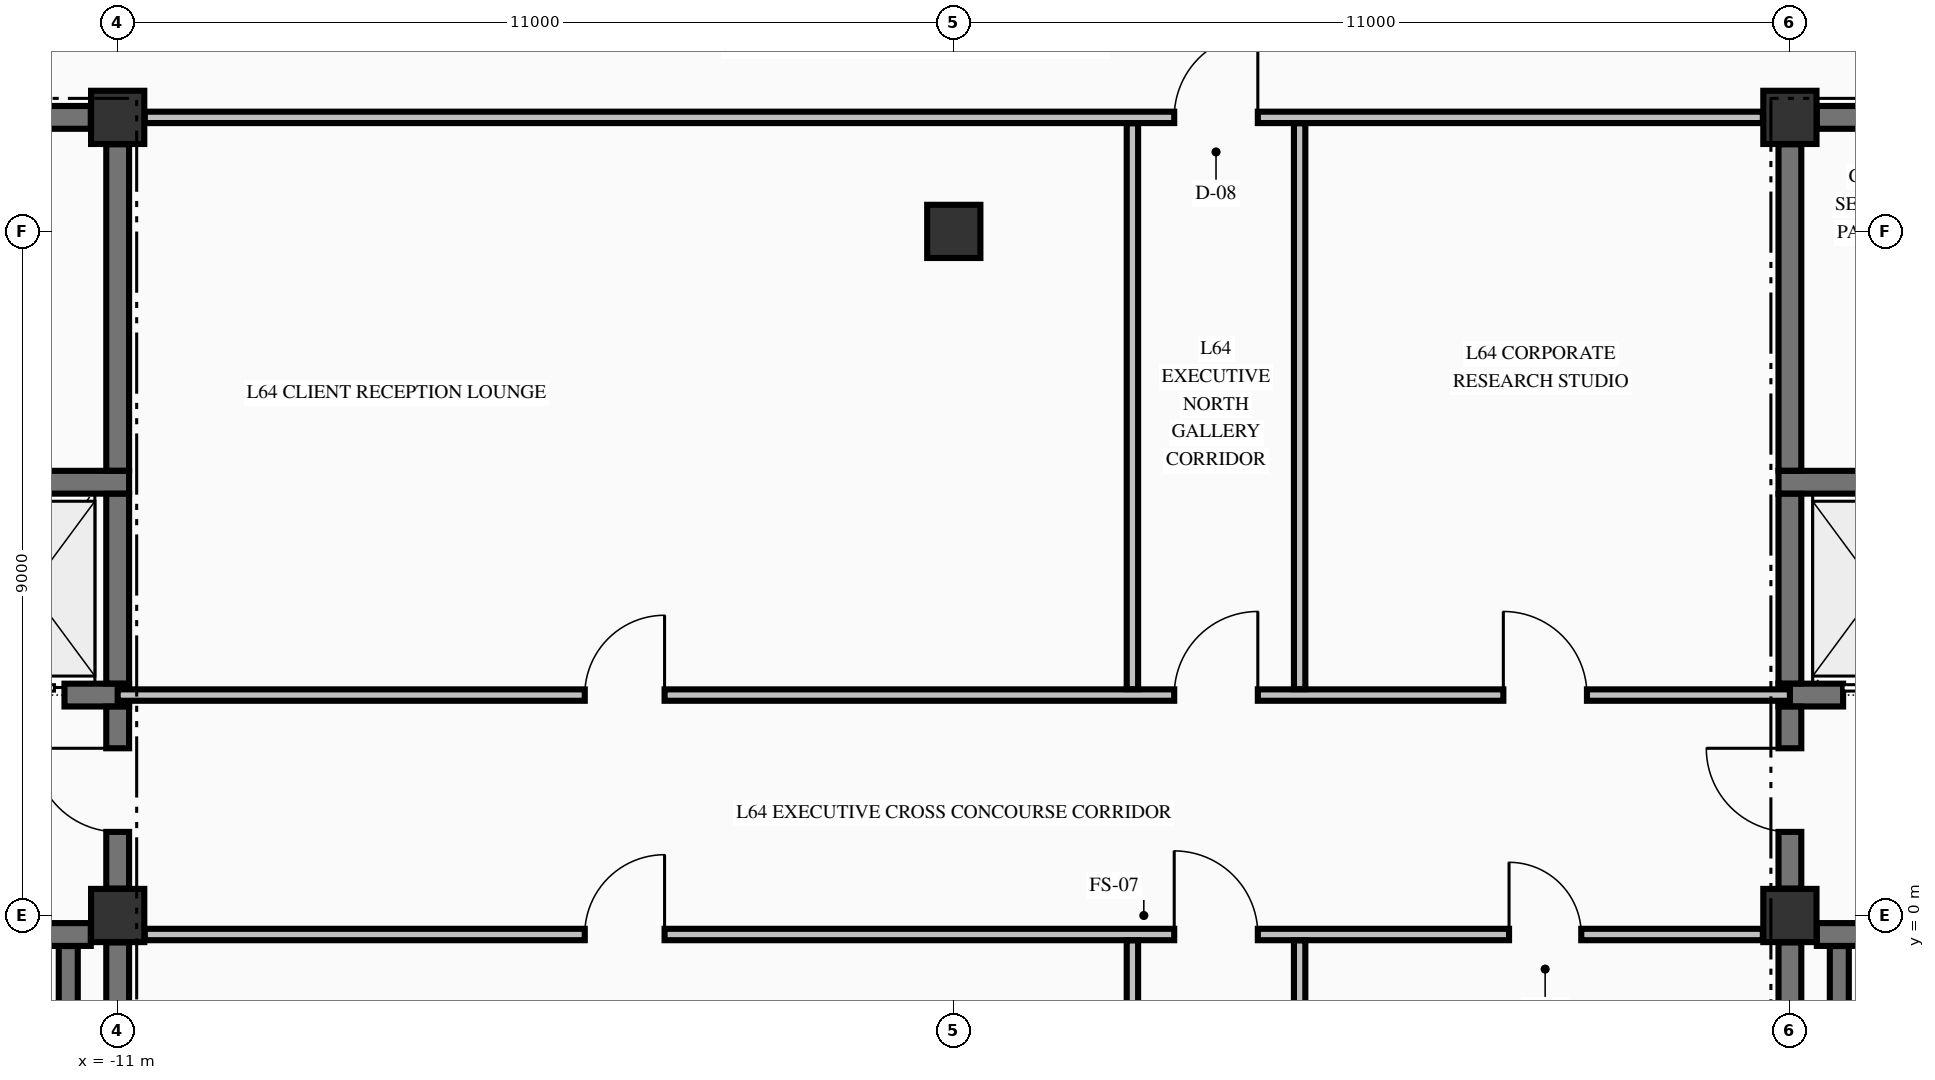
"""IFC4 building model, lengths in metres.
Left out: names, types, materials, properties, quantities, classifications, styles, units other than length and angle.
Written with IfcOpenShell. Run it as: python <this file> out.ifc"""

import sys

from ifc_helpers import new_model, si_unit, direction, frame, frame_2d, origin, origin_2d, place, context, subcontext, project, spatial, rectangle, extrude, element, fill, save


model = new_model("IFC4")
c1 = context("Model", 3, precision=1e-05, world=origin(), true_north=direction((0.0, 1.0)))
c2 = subcontext(c1, "Body", "Model", "MODEL_VIEW")
j1 = project(units=[si_unit("LENGTHUNIT", "METRE"), si_unit("PLANEANGLEUNIT", "RADIAN")], contexts=[c1])
p1 = place(None, origin())
s1 = spatial("IfcSite", under=j1, at=p1, CompositionType="ELEMENT")
p2 = place(p1, origin())
s2 = spatial("IfcBuilding", under=s1, at=p2, CompositionType="ELEMENT")
p3 = place(p2, frame((0.0, 0.0, 242.97)))
s3 = spatial("IfcBuildingStorey", under=s2, at=p3, CompositionType="ELEMENT", Elevation=242.97)
for number, where, z_axis, x_axis in (
    (1, (-11.0, 0.0, -0.25), (0.0, 0.0, 1.0), (1.0, 0.0, 0.0)),
    (2, (-11.0, 10.5, -0.25), (0.0, 0.0, 1.0), (1.0, 0.0, 0.0)),
    (3, (11.0, 0.0, -0.25), (0.0, 0.0, 1.0), (1.0, 0.0, 0.0)),
    (4, (11.0, 10.5, -0.25), (0.0, 0.0, 1.0), (1.0, 0.0, 0.0)),
    (5, (0.0, 9.0, -0.25), (0.0, 0.0, 1.0), (1.0, 0.0, 0.0)),
):
    element("IfcColumn", number, at=place(p3, frame(where, z_axis=z_axis, x_axis=x_axis)), inside=s3, PredefinedType="COLUMN", context=c2, shape_type="SweptSolid", body=[
        extrude(rectangle(XDim=0.7, YDim=0.7, at=origin_2d()), origin(), (0.0, 0.0, 1.0), 3.23),
    ])
p4 = place(p3, frame((-20.571, -0.25, 0.0), z_axis=(0.0, 0.0, 1.0), x_axis=(1.0, 0.0, 0.0)))
e6 = element("IfcWall", 6, at=p4, inside=s3, PredefinedType="SHEAR", context=c2, shape_type="SweptSolid", body=[
    extrude(rectangle(XDim=9.217, YDim=0.3, at=frame_2d((4.608, 0.0))), origin(), (0.0, 0.0, 1.0), 2.98),
])
p5 = place(p4, frame((6.871, 0.0, 0.0)))
e7 = element("IfcOpeningElement", 7, at=p5, cuts=e6, PredefinedType="OPENING", context=c2, shape_type="SweptSolid", body=[
    extrude(rectangle(XDim=1.1, YDim=2.15, at=frame_2d((0.55, 1.075))), frame((0.0, 0.16, 0.0), z_axis=(0.0, -1.0, 0.0), x_axis=(1.0, 0.0, 0.0)), (0.0, 0.0, 1.0), 0.32),
])
p6 = place(p3, frame((11.354, -0.25, 0.0), z_axis=(0.0, 0.0, 1.0), x_axis=(1.0, 0.0, 0.0)))
e8 = element("IfcWall", 8, at=p6, inside=s3, PredefinedType="SHEAR", context=c2, shape_type="SweptSolid", body=[
    extrude(rectangle(XDim=3.521, YDim=0.3, at=frame_2d((1.76, 0.0))), origin(), (0.0, 0.0, 1.0), 2.98),
])
p7 = place(p6, frame((1.246, 0.0, 0.0)))
e9 = element("IfcOpeningElement", 9, at=p7, cuts=e8, PredefinedType="OPENING", context=c2, shape_type="SweptSolid", body=[
    extrude(rectangle(XDim=1.1, YDim=2.15, at=frame_2d((0.55, 1.075))), frame((0.0, 0.16, 0.0), z_axis=(0.0, -1.0, 0.0), x_axis=(1.0, 0.0, 0.0)), (0.0, 0.0, 1.0), 0.32),
])
p8 = place(p3, frame((-14.875, 2.9, 0.0), z_axis=(0.0, 0.0, 1.0), x_axis=(1.0, 0.0, 0.0)))
e10 = element("IfcWall", 10, at=p8, inside=s3, PredefinedType="SHEAR", context=c2, shape_type="SweptSolid", body=[
    extrude(rectangle(XDim=4.025, YDim=0.3, at=frame_2d((2.012, 0.0))), origin(), (0.0, 0.0, 1.0), 2.98),
])
p9 = place(p8, frame((2.075, 0.0, 0.0)))
e11 = element("IfcOpeningElement", 11, at=p9, cuts=e10, PredefinedType="OPENING", context=c2, shape_type="SweptSolid", body=[
    extrude(rectangle(XDim=1.1, YDim=2.2, at=frame_2d((0.55, 1.1))), frame((0.0, 0.16, 0.0), z_axis=(0.0, -1.0, 0.0), x_axis=(1.0, 0.0, 0.0)), (0.0, 0.0, 1.0), 0.32),
])
p10 = place(p3, frame((10.85, 2.9, 0.0), z_axis=(0.0, 0.0, 1.0), x_axis=(1.0, 0.0, 0.0)))
e12 = element("IfcWall", 12, at=p10, inside=s3, PredefinedType="SHEAR", context=c2, shape_type="SweptSolid", body=[
    extrude(rectangle(XDim=4.025, YDim=0.3, at=frame_2d((2.012, 0.0))), origin(), (0.0, 0.0, 1.0), 2.98),
])
p11 = place(p10, frame((0.85, 0.0, 0.0)))
e13 = element("IfcOpeningElement", 13, at=p11, cuts=e12, PredefinedType="OPENING", context=c2, shape_type="SweptSolid", body=[
    extrude(rectangle(XDim=1.1, YDim=2.2, at=frame_2d((0.55, 1.1))), frame((0.0, 0.16, 0.0), z_axis=(0.0, -1.0, 0.0), x_axis=(1.0, 0.0, 0.0)), (0.0, 0.0, 1.0), 0.32),
])
for number, where, z_axis, x_axis in (
    (14, (-14.875, 5.7, 0.0), (0.0, 0.0, 1.0), (1.0, 0.0, 0.0)),
    (15, (10.85, 5.7, 0.0), (0.0, 0.0, 1.0), (1.0, 0.0, 0.0)),
):
    element("IfcWall", number, at=place(p3, frame(where, z_axis=z_axis, x_axis=x_axis)), inside=s3, PredefinedType="SHEAR", context=c2, shape_type="SweptSolid", body=[
        extrude(rectangle(XDim=4.025, YDim=0.3, at=frame_2d((2.012, 0.0))), origin(), (0.0, 0.0, 1.0), 2.98),
    ])
p12 = place(p3, frame((-14.7, 10.5, 0.0), z_axis=(0.0, 0.0, 1.0), x_axis=(1.0, 0.0, 0.0)))
e16 = element("IfcWall", 16, at=p12, inside=s3, PredefinedType="SHEAR", context=c2, shape_type="SweptSolid", body=[
    extrude(rectangle(XDim=3.346, YDim=0.3, at=frame_2d((1.673, 0.0))), origin(), (0.0, 0.0, 1.0), 2.98),
])
p13 = place(p12, frame((0.775, 0.0, 0.0)))
e17 = element("IfcOpeningElement", 17, at=p13, cuts=e16, PredefinedType="OPENING", context=c2, shape_type="SweptSolid", body=[
    extrude(rectangle(XDim=0.95, YDim=2.15, at=frame_2d((0.475, 1.075))), frame((0.0, 0.16, 0.0), z_axis=(0.0, -1.0, 0.0), x_axis=(1.0, 0.0, 0.0)), (0.0, 0.0, 1.0), 0.32),
])
p14 = place(p3, frame((11.354, 10.5, 0.0), z_axis=(0.0, 0.0, 1.0), x_axis=(1.0, 0.0, 0.0)))
e18 = element("IfcWall", 18, at=p14, inside=s3, PredefinedType="SHEAR", context=c2, shape_type="SweptSolid", body=[
    extrude(rectangle(XDim=3.346, YDim=0.3, at=frame_2d((1.673, 0.0))), origin(), (0.0, 0.0, 1.0), 2.98),
])
p15 = place(p14, frame((2.151, 0.0, 0.0)))
e19 = element("IfcOpeningElement", 19, at=p15, cuts=e18, PredefinedType="OPENING", context=c2, shape_type="SweptSolid", body=[
    extrude(rectangle(XDim=0.95, YDim=2.15, at=frame_2d((0.475, 1.075))), frame((0.0, 0.16, 0.0), z_axis=(0.0, -1.0, 0.0), x_axis=(1.0, 0.0, 0.0)), (0.0, 0.0, 1.0), 0.32),
])
p16 = place(p3, frame((-10.644, -0.25, 0.0), z_axis=(0.0, 0.0, 1.0), x_axis=(1.0, 0.0, 0.0)))
e20 = element("IfcWall", 20, at=p16, inside=s3, PredefinedType="PARTITIONING", context=c2, shape_type="SweptSolid", body=[
    extrude(rectangle(XDim=21.288, YDim=0.15, at=frame_2d((10.644, 0.0))), origin(), (0.0, 0.0, 1.0), 2.98),
])
p17 = place(p16, frame((13.544, 0.0, 0.0)))
e21 = element("IfcOpeningElement", 21, at=p17, cuts=e20, PredefinedType="OPENING", context=c2, shape_type="SweptSolid", body=[
    extrude(rectangle(XDim=1.1, YDim=2.15, at=frame_2d((0.55, 1.075))), frame((0.0, 0.085, 0.0), z_axis=(0.0, -1.0, 0.0), x_axis=(1.0, 0.0, 0.0)), (0.0, 0.0, 1.0), 0.17),
])
p18 = place(p16, frame((5.789, 0.0, 0.0)))
e22 = element("IfcOpeningElement", 22, at=p18, cuts=e20, PredefinedType="OPENING", context=c2, shape_type="SweptSolid", body=[
    extrude(rectangle(XDim=1.05, YDim=2.15, at=frame_2d((0.525, 1.075))), frame((0.0, 0.085, 0.0), z_axis=(0.0, -1.0, 0.0), x_axis=(1.0, 0.0, 0.0)), (0.0, 0.0, 1.0), 0.17),
])
p19 = place(p16, frame((17.949, 0.0, 0.0)))
e23 = element("IfcOpeningElement", 23, at=p19, cuts=e20, PredefinedType="OPENING", context=c2, shape_type="SweptSolid", body=[
    extrude(rectangle(XDim=0.95, YDim=2.15, at=frame_2d((0.475, 1.075))), frame((0.0, 0.085, 0.0), z_axis=(0.0, -1.0, 0.0), x_axis=(1.0, 0.0, 0.0)), (0.0, 0.0, 1.0), 0.17),
])
p20 = place(p3, frame((-11.0, 2.9, 0.0), z_axis=(0.0, 0.0, 1.0), x_axis=(1.0, 0.0, 0.0)))
e24 = element("IfcWall", 24, at=p20, inside=s3, PredefinedType="PARTITIONING", context=c2, shape_type="SweptSolid", body=[
    extrude(rectangle(XDim=22.0, YDim=0.15, at=frame_2d((11.0, 0.0))), origin(), (0.0, 0.0, 1.0), 2.98),
])
p21 = place(p20, frame((13.9, 0.0, 0.0)))
e25 = element("IfcOpeningElement", 25, at=p21, cuts=e24, PredefinedType="OPENING", context=c2, shape_type="SweptSolid", body=[
    extrude(rectangle(XDim=1.1, YDim=2.15, at=frame_2d((0.55, 1.075))), frame((0.0, 0.085, 0.0), z_axis=(0.0, -1.0, 0.0), x_axis=(1.0, 0.0, 0.0)), (0.0, 0.0, 1.0), 0.17),
])
p22 = place(p20, frame((6.145, 0.0, 0.0)))
e26 = element("IfcOpeningElement", 26, at=p22, cuts=e24, PredefinedType="OPENING", context=c2, shape_type="SweptSolid", body=[
    extrude(rectangle(XDim=1.05, YDim=2.15, at=frame_2d((0.525, 1.075))), frame((0.0, 0.085, 0.0), z_axis=(0.0, -1.0, 0.0), x_axis=(1.0, 0.0, 0.0)), (0.0, 0.0, 1.0), 0.17),
])
p23 = place(p20, frame((18.23, 0.0, 0.0)))
e27 = element("IfcOpeningElement", 27, at=p23, cuts=e24, PredefinedType="OPENING", context=c2, shape_type="SweptSolid", body=[
    extrude(rectangle(XDim=1.1, YDim=2.15, at=frame_2d((0.55, 1.075))), frame((0.0, 0.085, 0.0), z_axis=(0.0, -1.0, 0.0), x_axis=(1.0, 0.0, 0.0)), (0.0, 0.0, 1.0), 0.17),
])
p24 = place(p3, frame((-10.644, 10.5, 0.0), z_axis=(0.0, 0.0, 1.0), x_axis=(1.0, 0.0, 0.0)))
e28 = element("IfcWall", 28, at=p24, inside=s3, PredefinedType="PARTITIONING", context=c2, shape_type="SweptSolid", body=[
    extrude(rectangle(XDim=21.288, YDim=0.15, at=frame_2d((10.644, 0.0))), origin(), (0.0, 0.0, 1.0), 2.98),
])
p25 = place(p24, frame((13.544, 0.0, 0.0)))
e29 = element("IfcOpeningElement", 29, at=p25, cuts=e28, PredefinedType="OPENING", context=c2, shape_type="SweptSolid", body=[
    extrude(rectangle(XDim=1.1, YDim=2.15, at=frame_2d((0.55, 1.075))), frame((0.0, 0.085, 0.0), z_axis=(0.0, -1.0, 0.0), x_axis=(1.0, 0.0, 0.0)), (0.0, 0.0, 1.0), 0.17),
])
p26 = place(p3, frame((-11.65, -9.798, 0.0), z_axis=(0.0, 0.0, 1.0), x_axis=(0.0, 1.0, 0.0)))
e30 = element("IfcWall", 30, at=p26, inside=s3, PredefinedType="SOLIDWALL", context=c2, shape_type="SweptSolid", body=[
    extrude(rectangle(XDim=9.396, YDim=0.25, at=frame_2d((4.698, 0.0))), origin(), (0.0, 0.0, 1.0), 2.98),
])
p27 = place(p3, frame((-11.0, -9.596, 0.0), z_axis=(0.0, 0.0, 1.0), x_axis=(0.0, 1.0, 0.0)))
e31 = element("IfcWall", 31, at=p27, inside=s3, PredefinedType="SHEAR", context=c2, shape_type="SweptSolid", body=[
    extrude(rectangle(XDim=9.242, YDim=0.3, at=frame_2d((4.621, 0.0))), origin(), (0.0, 0.0, 1.0), 2.98),
])
p28 = place(p3, frame((-11.0, 0.354, 0.0), z_axis=(0.0, 0.0, 1.0), x_axis=(0.0, 1.0, 0.0)))
e32 = element("IfcWall", 32, at=p28, inside=s3, PredefinedType="SHEAR", context=c2, shape_type="SweptSolid", body=[
    extrude(rectangle(XDim=2.394, YDim=0.3, at=frame_2d((1.197, 0.0))), origin(), (0.0, 0.0, 1.0), 2.98),
])
p29 = place(p28, frame((0.746, 0.0, 0.0)))
e33 = element("IfcOpeningElement", 33, at=p29, cuts=e32, PredefinedType="OPENING", context=c2, shape_type="SweptSolid", body=[
    extrude(rectangle(XDim=1.1, YDim=2.15, at=frame_2d((0.55, 1.075))), frame((0.0, 0.16, 0.0), z_axis=(0.0, -1.0, 0.0), x_axis=(1.0, 0.0, 0.0)), (0.0, 0.0, 1.0), 0.32),
])
p30 = place(p3, frame((-11.0, 3.052, 0.0), z_axis=(0.0, 0.0, 1.0), x_axis=(0.0, 1.0, 0.0)))
e34 = element("IfcWall", 34, at=p30, inside=s3, PredefinedType="SHEAR", context=c2, shape_type="SweptSolid", body=[
    extrude(rectangle(XDim=2.496, YDim=0.3, at=frame_2d((1.248, 0.0))), origin(), (0.0, 0.0, 1.0), 2.98),
])
p31 = place(p3, frame((-11.0, 5.852, 0.0), z_axis=(0.0, 0.0, 1.0), x_axis=(0.0, 1.0, 0.0)))
e35 = element("IfcWall", 35, at=p31, inside=s3, PredefinedType="SHEAR", context=c2, shape_type="SweptSolid", body=[
    extrude(rectangle(XDim=4.294, YDim=0.3, at=frame_2d((2.147, 0.0))), origin(), (0.0, 0.0, 1.0), 2.98),
])
p32 = place(p3, frame((11.0, -9.596, 0.0), z_axis=(0.0, 0.0, 1.0), x_axis=(0.0, 1.0, 0.0)))
e36 = element("IfcWall", 36, at=p32, inside=s3, PredefinedType="SHEAR", context=c2, shape_type="SweptSolid", body=[
    extrude(rectangle(XDim=9.242, YDim=0.3, at=frame_2d((4.621, 0.0))), origin(), (0.0, 0.0, 1.0), 2.98),
])
p33 = place(p3, frame((11.0, 0.354, 0.0), z_axis=(0.0, 0.0, 1.0), x_axis=(0.0, 1.0, 0.0)))
e37 = element("IfcWall", 37, at=p33, inside=s3, PredefinedType="SHEAR", context=c2, shape_type="SweptSolid", body=[
    extrude(rectangle(XDim=2.394, YDim=0.3, at=frame_2d((1.197, 0.0))), origin(), (0.0, 0.0, 1.0), 2.98),
])
p34 = place(p33, frame((0.746, 0.0, 0.0)))
e38 = element("IfcOpeningElement", 38, at=p34, cuts=e37, PredefinedType="OPENING", context=c2, shape_type="SweptSolid", body=[
    extrude(rectangle(XDim=1.1, YDim=2.15, at=frame_2d((0.55, 1.075))), frame((0.0, 0.16, 0.0), z_axis=(0.0, -1.0, 0.0), x_axis=(1.0, 0.0, 0.0)), (0.0, 0.0, 1.0), 0.32),
])
p35 = place(p3, frame((11.0, 3.052, 0.0), z_axis=(0.0, 0.0, 1.0), x_axis=(0.0, 1.0, 0.0)))
e39 = element("IfcWall", 39, at=p35, inside=s3, PredefinedType="SHEAR", context=c2, shape_type="SweptSolid", body=[
    extrude(rectangle(XDim=2.496, YDim=0.3, at=frame_2d((1.248, 0.0))), origin(), (0.0, 0.0, 1.0), 2.98),
])
p36 = place(p3, frame((11.0, 5.852, 0.0), z_axis=(0.0, 0.0, 1.0), x_axis=(0.0, 1.0, 0.0)))
e40 = element("IfcWall", 40, at=p36, inside=s3, PredefinedType="SHEAR", context=c2, shape_type="SweptSolid", body=[
    extrude(rectangle(XDim=4.294, YDim=0.3, at=frame_2d((2.147, 0.0))), origin(), (0.0, 0.0, 1.0), 2.98),
])
p37 = place(p3, frame((11.65, -9.798, 0.0), z_axis=(0.0, 0.0, 1.0), x_axis=(0.0, 1.0, 0.0)))
e41 = element("IfcWall", 41, at=p37, inside=s3, PredefinedType="SOLIDWALL", context=c2, shape_type="SweptSolid", body=[
    extrude(rectangle(XDim=9.396, YDim=0.25, at=frame_2d((4.698, 0.0))), origin(), (0.0, 0.0, 1.0), 2.98),
])
p38 = place(p3, frame((2.35, -9.872, 0.0), z_axis=(0.0, 0.0, 1.0), x_axis=(0.0, 1.0, 0.0)))
e42 = element("IfcWall", 42, at=p38, inside=s3, PredefinedType="PARTITIONING", context=c2, shape_type="SweptSolid", body=[
    extrude(rectangle(XDim=9.544, YDim=0.15, at=frame_2d((4.772, 0.0))), origin(), (0.0, 0.0, 1.0), 2.98),
])
p39 = place(p3, frame((2.35, 2.978, 0.0), z_axis=(0.0, 0.0, 1.0), x_axis=(0.0, 1.0, 0.0)))
e43 = element("IfcWall", 43, at=p39, inside=s3, PredefinedType="PARTITIONING", context=c2, shape_type="SweptSolid", body=[
    extrude(rectangle(XDim=7.444, YDim=0.15, at=frame_2d((3.722, 0.0))), origin(), (0.0, 0.0, 1.0), 2.98),
])
p40 = place(p3, frame((4.55, -4.747, 0.0), z_axis=(0.0, 0.0, 1.0), x_axis=(0.0, 1.0, 0.0)))
e44 = element("IfcWall", 44, at=p40, inside=s3, PredefinedType="PARTITIONING", context=c2, shape_type="SweptSolid", body=[
    extrude(rectangle(XDim=4.419, YDim=0.15, at=frame_2d((2.209, 0.0))), origin(), (0.0, 0.0, 1.0), 2.98),
])
p41 = place(p3, frame((4.55, 2.978, 0.0), z_axis=(0.0, 0.0, 1.0), x_axis=(0.0, 1.0, 0.0)))
e45 = element("IfcWall", 45, at=p41, inside=s3, PredefinedType="PARTITIONING", context=c2, shape_type="SweptSolid", body=[
    extrude(rectangle(XDim=7.444, YDim=0.15, at=frame_2d((3.722, 0.0))), origin(), (0.0, 0.0, 1.0), 2.98),
])
p42 = place(p29, origin())
e46 = element("IfcDoor", 46, at=p42, inside=s3, OperationType="SINGLE_SWING_RIGHT", PredefinedType="DOOR", context=c2, shape_type="SweptSolid", body=[
    extrude(rectangle(XDim=1.1, YDim=2.15, at=frame_2d((0.55, 1.075))), frame((0.0, 0.025, 0.0), z_axis=(0.0, -1.0, 0.0), x_axis=(1.0, 0.0, 0.0)), (0.0, 0.0, 1.0), 0.05),
])
fill(e33, e46)
p43 = place(p9, origin())
e47 = element("IfcDoor", 47, at=p43, inside=s3, OperationType="SLIDING_TO_LEFT", PredefinedType="DOOR", context=c2, shape_type="SweptSolid", body=[
    extrude(rectangle(XDim=1.1, YDim=2.2, at=frame_2d((0.55, 1.1))), frame((0.0, 0.025, 0.0), z_axis=(0.0, -1.0, 0.0), x_axis=(1.0, 0.0, 0.0)), (0.0, 0.0, 1.0), 0.05),
])
fill(e11, e47)
p44 = place(p34, origin())
e48 = element("IfcDoor", 48, at=p44, inside=s3, OperationType="SINGLE_SWING_RIGHT", PredefinedType="DOOR", context=c2, shape_type="SweptSolid", body=[
    extrude(rectangle(XDim=1.1, YDim=2.15, at=frame_2d((0.55, 1.075))), frame((0.0, 0.025, 0.0), z_axis=(0.0, -1.0, 0.0), x_axis=(1.0, 0.0, 0.0)), (0.0, 0.0, 1.0), 0.05),
])
fill(e38, e48)
p45 = place(p11, origin())
e49 = element("IfcDoor", 49, at=p45, inside=s3, OperationType="SLIDING_TO_RIGHT", PredefinedType="DOOR", context=c2, shape_type="SweptSolid", body=[
    extrude(rectangle(XDim=1.1, YDim=2.2, at=frame_2d((0.55, 1.1))), frame((0.0, 0.025, 0.0), z_axis=(0.0, -1.0, 0.0), x_axis=(1.0, 0.0, 0.0)), (0.0, 0.0, 1.0), 0.05),
])
fill(e13, e49)
p46 = place(p25, origin())
e50 = element("IfcDoor", 50, at=p46, inside=s3, OperationType="SINGLE_SWING_RIGHT", PredefinedType="DOOR", context=c2, shape_type="SweptSolid", body=[
    extrude(rectangle(XDim=1.1, YDim=2.15, at=frame_2d((0.55, 1.075))), frame((0.0, 0.025, 0.0), z_axis=(0.0, -1.0, 0.0), x_axis=(1.0, 0.0, 0.0)), (0.0, 0.0, 1.0), 0.05),
])
fill(e29, e50)
p47 = place(p21, origin())
e51 = element("IfcDoor", 51, at=p47, inside=s3, OperationType="SINGLE_SWING_RIGHT", PredefinedType="DOOR", context=c2, shape_type="SweptSolid", body=[
    extrude(rectangle(XDim=1.1, YDim=2.15, at=frame_2d((0.55, 1.075))), frame((0.0, 0.025, 0.0), z_axis=(0.0, -1.0, 0.0), x_axis=(1.0, 0.0, 0.0)), (0.0, 0.0, 1.0), 0.05),
])
fill(e25, e51)
p48 = place(p17, origin())
e52 = element("IfcDoor", 52, at=p48, inside=s3, OperationType="SINGLE_SWING_LEFT", PredefinedType="DOOR", context=c2, shape_type="SweptSolid", body=[
    extrude(rectangle(XDim=1.1, YDim=2.15, at=frame_2d((0.55, 1.075))), frame((0.0, 0.025, 0.0), z_axis=(0.0, -1.0, 0.0), x_axis=(1.0, 0.0, 0.0)), (0.0, 0.0, 1.0), 0.05),
])
fill(e21, e52)
p49 = place(p22, origin())
e53 = element("IfcDoor", 53, at=p49, inside=s3, OperationType="SINGLE_SWING_RIGHT", PredefinedType="DOOR", context=c2, shape_type="SweptSolid", body=[
    extrude(rectangle(XDim=1.05, YDim=2.15, at=frame_2d((0.525, 1.075))), frame((0.0, 0.025, 0.0), z_axis=(0.0, -1.0, 0.0), x_axis=(1.0, 0.0, 0.0)), (0.0, 0.0, 1.0), 0.05),
])
fill(e26, e53)
p50 = place(p23, origin())
e54 = element("IfcDoor", 54, at=p50, inside=s3, OperationType="SINGLE_SWING_LEFT", PredefinedType="DOOR", context=c2, shape_type="SweptSolid", body=[
    extrude(rectangle(XDim=1.1, YDim=2.15, at=frame_2d((0.55, 1.075))), frame((0.0, 0.025, 0.0), z_axis=(0.0, -1.0, 0.0), x_axis=(1.0, 0.0, 0.0)), (0.0, 0.0, 1.0), 0.05),
])
fill(e27, e54)
p51 = place(p18, origin())
e55 = element("IfcDoor", 55, at=p51, inside=s3, OperationType="SINGLE_SWING_RIGHT", PredefinedType="DOOR", context=c2, shape_type="SweptSolid", body=[
    extrude(rectangle(XDim=1.05, YDim=2.15, at=frame_2d((0.525, 1.075))), frame((0.0, 0.025, 0.0), z_axis=(0.0, -1.0, 0.0), x_axis=(1.0, 0.0, 0.0)), (0.0, 0.0, 1.0), 0.05),
])
fill(e22, e55)
p52 = place(p19, origin())
e56 = element("IfcDoor", 56, at=p52, inside=s3, OperationType="SINGLE_SWING_LEFT", PredefinedType="DOOR", context=c2, shape_type="SweptSolid", body=[
    extrude(rectangle(XDim=0.95, YDim=2.15, at=frame_2d((0.475, 1.075))), frame((0.0, 0.025, 0.0), z_axis=(0.0, -1.0, 0.0), x_axis=(1.0, 0.0, 0.0)), (0.0, 0.0, 1.0), 0.05),
])
fill(e23, e56)
save(model, sys.argv[1])
